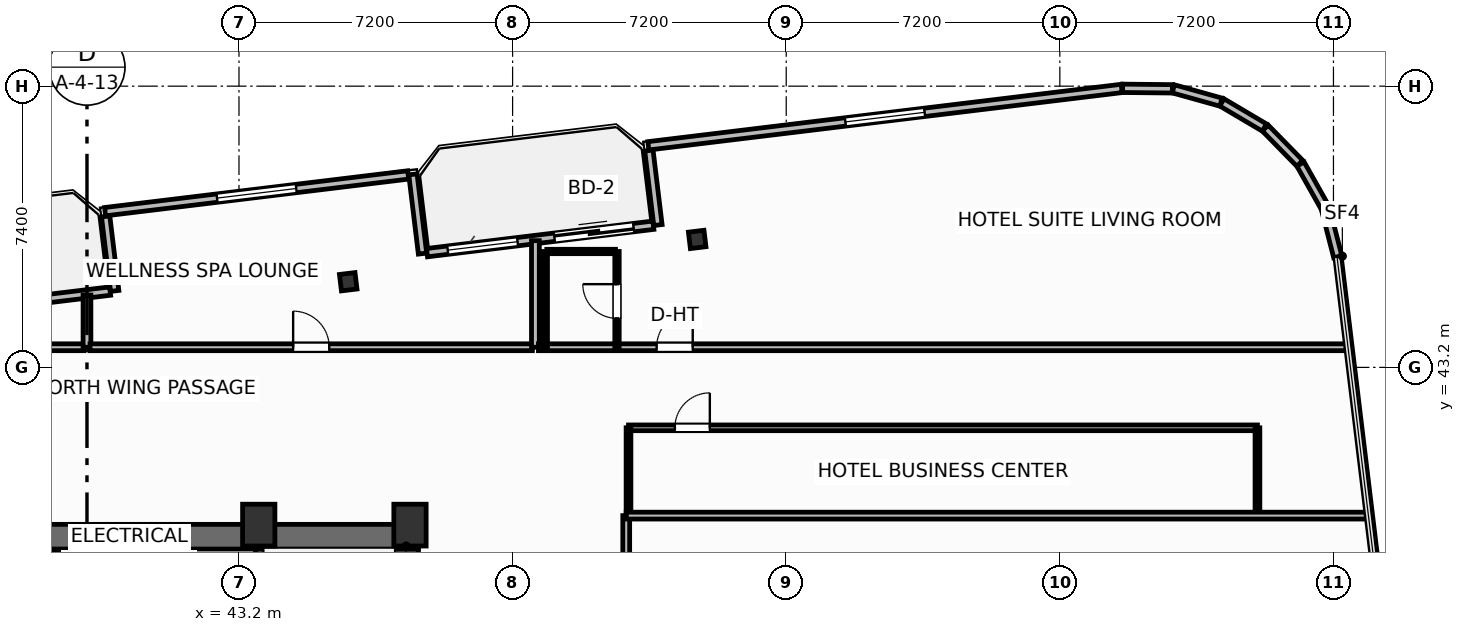
"""IFC4 building model, lengths in metres.
Left out: names, types, materials, properties, quantities, classifications, styles, units other than length and angle.
Written with IfcOpenShell. Run it as: python <this file> out.ifc"""

import sys

from ifc_helpers import new_model, si_unit, direction, frame, frame_2d, origin, origin_2d, place, context, subcontext, project, spatial, rectangle, i_section, extrude, element, fill, save


model = new_model("IFC4")
c1 = context("Model", 3, precision=1e-05, world=origin(), true_north=direction((0.0, 1.0)))
c2 = subcontext(c1, "Body", "Model", "MODEL_VIEW")
j1 = project(units=[si_unit("LENGTHUNIT", "METRE"), si_unit("PLANEANGLEUNIT", "RADIAN")], contexts=[c1])
p1 = place(None, origin())
s1 = spatial("IfcSite", under=j1, at=p1, CompositionType="ELEMENT")
p2 = place(p1, origin())
s2 = spatial("IfcBuilding", under=s1, at=p2, CompositionType="ELEMENT")
p3 = place(p2, frame((0.0, 0.0, 200.5)))
s3 = spatial("IfcBuildingStorey", under=s2, at=p3, CompositionType="ELEMENT", Elevation=200.5)
for number, where, z_axis, x_axis in (
    (1, (43.72, 39.05, 0.0), (0.0, 0.0, 1.0), (1.0, 0.0, 0.0)),
    (2, (47.7, 39.05, 0.0), (0.0, 0.0, 1.0), (1.0, 0.0, 0.0)),
):
    element("IfcColumn", number, at=place(p3, frame(where, z_axis=z_axis, x_axis=x_axis)), inside=s3, PredefinedType="COLUMN", context=c2, shape_type="SweptSolid", body=[
        extrude(rectangle(XDim=0.85, YDim=1.1, at=origin_2d()), origin(), (0.0, 0.0, 1.0), 3.7),
    ])
p4 = place(p3, frame((30.48, 38.745, 0.0), z_axis=(0.0, 0.0, 1.0), x_axis=(1.0, 0.0, 0.0)))
e3 = element("IfcWall", 3, at=p4, inside=s3, PredefinedType="SHEAR", context=c2, shape_type="SweptSolid", body=[
    extrude(rectangle(XDim=17.44, YDim=0.65, at=frame_2d((8.72, 0.0))), origin(), (0.0, 0.0, 1.0), 3.45),
])
p5 = place(p3, frame((47.595, 29.2, 0.0), z_axis=(0.0, 0.0, 1.0), x_axis=(0.0, 1.0, 0.0)))
e4 = element("IfcWall", 4, at=p5, inside=s3, PredefinedType="SHEAR", context=c2, shape_type="SweptSolid", body=[
    extrude(rectangle(XDim=9.22, YDim=0.65, at=frame_2d((4.61, 0.0))), origin(), (0.0, 0.0, 1.0), 3.45),
])
p6 = place(p3, frame((43.76, 29.2, 0.0), z_axis=(0.0, 0.0, 1.0), x_axis=(0.0, 1.0, 0.0)))
e5 = element("IfcWall", 5, at=p6, inside=s3, PredefinedType="SHEAR", context=c2, shape_type="SweptSolid", body=[
    extrude(rectangle(XDim=9.22, YDim=0.25, at=frame_2d((4.61, 0.0))), origin(), (0.0, 0.0, 1.0), 3.45),
])
p7 = place(p6, frame((0.65, 0.0, 0.0)))
e6 = element("IfcOpeningElement", 6, at=p7, cuts=e5, PredefinedType="OPENING", context=c2, shape_type="SweptSolid", body=[
    extrude(rectangle(XDim=1.05, YDim=2.15, at=frame_2d((0.525, 1.075))), frame((0.0, 0.135, 0.0), z_axis=(0.0, -1.0, 0.0), x_axis=(1.0, 0.0, 0.0)), (0.0, 0.0, 1.0), 0.27),
])
for number, where, z_axis, x_axis in (
    (7, (55.257, 46.567, 0.0), (0.0, 0.0, 1.0), (0.993, 0.12, 0.0)),
    (8, (46.075, 45.454, 0.0), (0.0, 0.0, 1.0), (0.993, 0.12, 0.0)),
):
    element("IfcColumn", number, at=place(p3, frame(where, z_axis=z_axis, x_axis=x_axis)), inside=s3, PredefinedType="COLUMN", context=c2, shape_type="SweptSolid", body=[
        extrude(i_section(OverallWidth=0.412, OverallDepth=0.435, WebThickness=0.036, FlangeThickness=0.057, FilletRadius=0.025, at=origin_2d()), origin(), (0.0, 0.0, 1.0), 3.7),
    ])
p8 = place(p3, frame((33.852, 44.486, 0.0), z_axis=(0.0, 0.0, 1.0), x_axis=(0.992729951822, 0.120362962556, 0.0)))
e9 = element("IfcWall", 9, at=p8, inside=s3, PredefinedType="SOLIDWALL", context=c2, shape_type="SweptSolid", body=[
    extrude(rectangle(XDim=6.0, YDim=0.22, at=frame_2d((3.0, 0.0))), origin(), (0.0, 0.0, 1.0), 2.73),
])
p9 = place(p8, frame((0.4, 0.0, 0.0)))
e10 = element("IfcOpeningElement", 10, at=p9, cuts=e9, PredefinedType="OPENING", context=c2, shape_type="SweptSolid", body=[
    extrude(rectangle(XDim=2.1, YDim=2.3, at=frame_2d((1.05, 1.15))), frame((0.0, 0.12, 0.0), z_axis=(0.0, -1.0, 0.0), x_axis=(1.0, 0.0, 0.0)), (0.0, 0.0, 1.0), 0.24),
])
p10 = place(p3, frame((48.148, 46.219, 0.0), z_axis=(0.0, 0.0, 1.0), x_axis=(0.992729951822, 0.120362962556, 0.0)))
e11 = element("IfcWall", 11, at=p10, inside=s3, PredefinedType="SOLIDWALL", context=c2, shape_type="SweptSolid", body=[
    extrude(rectangle(XDim=6.0, YDim=0.22, at=frame_2d((3.0, 0.0))), origin(), (0.0, 0.0, 1.0), 2.73),
])
p11 = place(p10, frame((3.376, 0.0, 0.0)))
e12 = element("IfcOpeningElement", 12, at=p11, cuts=e11, PredefinedType="OPENING", context=c2, shape_type="SweptSolid", body=[
    extrude(rectangle(XDim=2.1, YDim=2.3, at=frame_2d((1.05, 1.15))), frame((0.0, 0.12, 0.0), z_axis=(0.0, -1.0, 0.0), x_axis=(1.0, 0.0, 0.0)), (0.0, 0.0, 1.0), 0.24),
])
p12 = place(p10, frame((0.55, 0.0, 0.75)))
e13 = element("IfcOpeningElement", 13, at=p12, cuts=e11, PredefinedType="OPENING", context=c2, shape_type="SweptSolid", body=[
    extrude(rectangle(XDim=1.85, YDim=1.75, at=frame_2d((0.925, 0.875))), frame((0.0, 0.12, 0.0), z_axis=(0.0, -1.0, 0.0), x_axis=(1.0, 0.0, 0.0)), (0.0, 0.0, 1.0), 0.24),
])
p13 = place(p3, frame((72.114, 46.112, 0.0), z_axis=(0.0, 0.0, 1.0), x_axis=(-0.248942347653, 0.968518305219, 0.0)))
e14 = element("IfcWall", 14, at=p13, inside=s3, PredefinedType="SOLIDWALL", context=c2, shape_type="SweptSolid", body=[
    extrude(rectangle(XDim=1.326, YDim=0.22, at=frame_2d((0.663, 0.0))), origin(), (0.0, 0.0, 1.0), 2.73),
])
p14 = place(p3, frame((71.771, 47.418, 0.0), z_axis=(0.0, 0.0, 1.0), x_axis=(-0.491098509465, 0.871104043155, 0.0)))
e15 = element("IfcWall", 15, at=p14, inside=s3, PredefinedType="SOLIDWALL", context=c2, shape_type="SweptSolid", body=[
    extrude(rectangle(XDim=1.301, YDim=0.22, at=frame_2d((0.65, 0.0))), origin(), (0.0, 0.0, 1.0), 2.73),
])
p15 = place(p3, frame((71.115, 48.569, 0.0), z_axis=(0.0, 0.0, 1.0), x_axis=(-0.699844331926, 0.714295394827, 0.0)))
e16 = element("IfcWall", 16, at=p15, inside=s3, PredefinedType="SOLIDWALL", context=c2, shape_type="SweptSolid", body=[
    extrude(rectangle(XDim=1.301, YDim=0.22, at=frame_2d((0.65, 0.0))), origin(), (0.0, 0.0, 1.0), 2.73),
])
p16 = place(p3, frame((70.183, 49.511, 0.0), z_axis=(0.0, 0.0, 1.0), x_axis=(-0.860933999601, 0.508716668029, 0.0)))
e17 = element("IfcWall", 17, at=p16, inside=s3, PredefinedType="SOLIDWALL", context=c2, shape_type="SweptSolid", body=[
    extrude(rectangle(XDim=1.301, YDim=0.22, at=frame_2d((0.65, 0.0))), origin(), (0.0, 0.0, 1.0), 2.73),
])
p17 = place(p3, frame((69.039, 50.18, 0.0), z_axis=(0.0, 0.0, 1.0), x_axis=(-0.963205341366, 0.26876657226, 0.0)))
e18 = element("IfcWall", 18, at=p17, inside=s3, PredefinedType="SOLIDWALL", context=c2, shape_type="SweptSolid", body=[
    extrude(rectangle(XDim=1.301, YDim=0.22, at=frame_2d((0.65, 0.0))), origin(), (0.0, 0.0, 1.0), 2.73),
])
p18 = place(p3, frame((67.761, 50.53, 0.0), z_axis=(0.0, 0.0, 1.0), x_axis=(-0.999947358106, 0.010260653861, 0.0)))
e19 = element("IfcWall", 19, at=p18, inside=s3, PredefinedType="SOLIDWALL", context=c2, shape_type="SweptSolid", body=[
    extrude(rectangle(XDim=1.309, YDim=0.22, at=frame_2d((0.654, 0.0))), origin(), (0.0, 0.0, 1.0), 2.73),
])
p19 = place(p3, frame((66.427, 50.54, 0.0), z_axis=(0.0, 0.0, 1.0), x_axis=(-0.992731739233, -0.120348219431, 0.0)))
e20 = element("IfcWall", 20, at=p19, inside=s3, PredefinedType="SOLIDWALL", context=c2, shape_type="SweptSolid", body=[
    extrude(rectangle(XDim=12.547, YDim=0.22, at=frame_2d((6.273, 0.0))), origin(), (0.0, 0.0, 1.0), 2.73),
])
p20 = place(p19, frame((5.224, 0.0, 0.8)))
e21 = element("IfcOpeningElement", 21, at=p20, cuts=e20, PredefinedType="OPENING", context=c2, shape_type="SweptSolid", body=[
    extrude(rectangle(XDim=2.1, YDim=1.75, at=frame_2d((1.05, 0.875))), frame((0.0, 0.12, 0.0), z_axis=(0.0, -1.0, 0.0), x_axis=(1.0, 0.0, 0.0)), (0.0, 0.0, 1.0), 0.24),
])
p21 = place(p3, frame((53.987, 48.906, 0.0), z_axis=(0.0, 0.0, 1.0), x_axis=(0.120397815541, -0.992725725472, 0.0)))
e22 = element("IfcWall", 22, at=p21, inside=s3, PredefinedType="SOLIDWALL", context=c2, shape_type="SweptSolid", body=[
    extrude(rectangle(XDim=1.975, YDim=0.22, at=frame_2d((0.988, 0.0))), origin(), (0.0, 0.0, 1.0), 2.73),
])
p22 = place(p3, frame((48.03, 46.194, 0.0), z_axis=(0.0, 0.0, 1.0), x_axis=(-0.120314009587, 0.992735885871, 0.0)))
e23 = element("IfcWall", 23, at=p22, inside=s3, PredefinedType="SOLIDWALL", context=c2, shape_type="SweptSolid", body=[
    extrude(rectangle(XDim=2.1, YDim=0.22, at=frame_2d((1.05, 0.0))), origin(), (0.0, 0.0, 1.0), 2.73),
])
p23 = place(p3, frame((47.653, 48.264, 0.0), z_axis=(0.0, 0.0, 1.0), x_axis=(-0.992731032022, -0.120354052946, 0.0)))
e24 = element("IfcWall", 24, at=p23, inside=s3, PredefinedType="SOLIDWALL", context=c2, shape_type="SweptSolid", body=[
    extrude(rectangle(XDim=8.035, YDim=0.22, at=frame_2d((4.018, 0.0))), origin(), (0.0, 0.0, 1.0), 2.73),
])
p24 = place(p23, frame((2.968, 0.0, 0.8)))
e25 = element("IfcOpeningElement", 25, at=p24, cuts=e24, PredefinedType="OPENING", context=c2, shape_type="SweptSolid", body=[
    extrude(rectangle(XDim=2.1, YDim=1.75, at=frame_2d((1.05, 0.875))), frame((0.0, 0.12, 0.0), z_axis=(0.0, -1.0, 0.0), x_axis=(1.0, 0.0, 0.0)), (0.0, 0.0, 1.0), 0.24),
])
p25 = place(p3, frame((39.691, 47.173, 0.0), z_axis=(0.0, 0.0, 1.0), x_axis=(0.120397815541, -0.992725725472, 0.0)))
e26 = element("IfcWall", 26, at=p25, inside=s3, PredefinedType="SOLIDWALL", context=c2, shape_type="SweptSolid", body=[
    extrude(rectangle(XDim=1.975, YDim=0.22, at=frame_2d((0.988, 0.0))), origin(), (0.0, 0.0, 1.0), 2.73),
])
p26 = place(p3, frame((53.45, 41.61, 0.0), z_axis=(0.0, 0.0, 1.0), x_axis=(1.0, 0.0, 0.0)))
e27 = element("IfcWall", 27, at=p26, inside=s3, PredefinedType="PARTITIONING", context=c2, shape_type="SweptSolid", body=[
    extrude(rectangle(XDim=16.55, YDim=0.15, at=frame_2d((8.275, 0.0))), origin(), (0.0, 0.0, 1.0), 3.45),
])
p27 = place(p26, frame((1.22, 0.0, 0.0)))
e28 = element("IfcOpeningElement", 28, at=p27, cuts=e27, PredefinedType="OPENING", context=c2, shape_type="SweptSolid", body=[
    extrude(rectangle(XDim=0.92, YDim=2.05, at=frame_2d((0.46, 1.025))), frame((0.0, 0.085, 0.0), z_axis=(0.0, -1.0, 0.0), x_axis=(1.0, 0.0, 0.0)), (0.0, 0.0, 1.0), 0.17),
])
for number, where, z_axis, x_axis in (
    (29, (53.45, 39.3, 0.0), (0.0, 0.0, 1.0), (0.0, 1.0, 0.0)),
    (30, (70.0, 39.3, 0.0), (0.0, 0.0, 1.0), (0.0, 1.0, 0.0)),
):
    element("IfcWall", number, at=place(p3, frame(where, z_axis=z_axis, x_axis=x_axis)), inside=s3, PredefinedType="PARTITIONING", context=c2, shape_type="SweptSolid", body=[
        extrude(rectangle(XDim=2.31, YDim=0.125, at=frame_2d((1.155, 0.0))), origin(), (0.0, 0.0, 1.0), 3.45),
    ])
p28 = place(p3, frame((26.08, 43.73, 0.0), z_axis=(0.0, 0.0, 1.0), x_axis=(1.0, 0.0, 0.0)))
e31 = element("IfcWall", 31, at=p28, inside=s3, PredefinedType="PARTITIONING", context=c2, shape_type="SweptSolid", body=[
    extrude(rectangle(XDim=13.04, YDim=0.18, at=frame_2d((6.52, 0.0))), origin(), (0.0, 0.0, 1.0), 2.824),
])
p29 = place(p28, frame((6.045, 0.0, 0.0)))
e32 = element("IfcOpeningElement", 32, at=p29, cuts=e31, PredefinedType="OPENING", context=c2, shape_type="SweptSolid", body=[
    extrude(rectangle(XDim=0.95, YDim=2.05, at=frame_2d((0.475, 1.025))), frame((0.0, 0.1, 0.0), z_axis=(0.0, -1.0, 0.0), x_axis=(1.0, 0.0, 0.0)), (0.0, 0.0, 1.0), 0.2),
])
p30 = place(p3, frame((39.2, 43.73, 0.0), z_axis=(0.0, 0.0, 1.0), x_axis=(0.0, 1.0, 0.0)))
e33 = element("IfcWall", 33, at=p30, inside=s3, PredefinedType="PARTITIONING", context=c2, shape_type="SweptSolid", body=[
    extrude(rectangle(XDim=1.374, YDim=0.205, at=frame_2d((0.687, 0.0))), origin(), (0.0, 0.0, 1.0), 3.45),
])
p31 = place(p3, frame((39.28, 43.73, 0.0), z_axis=(0.0, 0.0, 1.0), x_axis=(1.0, 0.0, 0.0)))
e34 = element("IfcWall", 34, at=p31, inside=s3, PredefinedType="PARTITIONING", context=c2, shape_type="SweptSolid", body=[
    extrude(rectangle(XDim=11.64, YDim=0.18, at=frame_2d((5.82, 0.0))), origin(), (0.0, 0.0, 1.0), 3.018),
])
p32 = place(p31, frame((5.345, 0.0, 0.0)))
e35 = element("IfcOpeningElement", 35, at=p32, cuts=e34, PredefinedType="OPENING", context=c2, shape_type="SweptSolid", body=[
    extrude(rectangle(XDim=0.95, YDim=2.05, at=frame_2d((0.475, 1.025))), frame((0.0, 0.1, 0.0), z_axis=(0.0, -1.0, 0.0), x_axis=(1.0, 0.0, 0.0)), (0.0, 0.0, 1.0), 0.2),
])
p33 = place(p3, frame((51.0, 43.73, 0.0), z_axis=(0.0, 0.0, 1.0), x_axis=(0.0, 1.0, 0.0)))
e36 = element("IfcWall", 36, at=p33, inside=s3, PredefinedType="PARTITIONING", context=c2, shape_type="SweptSolid", body=[
    extrude(rectangle(XDim=2.804, YDim=0.205, at=frame_2d((1.402, 0.0))), origin(), (0.0, 0.0, 1.0), 3.45),
])
p34 = place(p3, frame((51.08, 43.73, 0.0), z_axis=(0.0, 0.0, 1.0), x_axis=(1.0, 0.0, 0.0)))
e37 = element("IfcWall", 37, at=p34, inside=s3, PredefinedType="PARTITIONING", context=c2, shape_type="SweptSolid", body=[
    extrude(rectangle(XDim=21.263, YDim=0.18, at=frame_2d((10.632, 0.0))), origin(), (0.0, 0.0, 1.0), 3.45),
])
p35 = place(p34, frame((3.11, 0.0, 0.0)))
e38 = element("IfcOpeningElement", 38, at=p35, cuts=e37, PredefinedType="OPENING", context=c2, shape_type="SweptSolid", body=[
    extrude(rectangle(XDim=0.95, YDim=2.15, at=frame_2d((0.475, 1.075))), frame((0.0, 0.1, 0.0), z_axis=(0.0, -1.0, 0.0), x_axis=(1.0, 0.0, 0.0)), (0.0, 0.0, 1.0), 0.2),
])
p36 = place(p3, frame((51.3, 46.25, 0.0), z_axis=(0.0, 0.0, 1.0), x_axis=(1.0, 0.0, 0.0)))
e39 = element("IfcWall", 39, at=p36, inside=s3, PredefinedType="PARTITIONING", context=c2, shape_type="SweptSolid", body=[
    extrude(rectangle(XDim=1.807, YDim=0.115, at=frame_2d((0.904, 0.0))), origin(), (0.0, 0.0, 1.0), 2.824),
])
p37 = place(p3, frame((53.147, 43.73, 0.0), z_axis=(0.0, 0.0, 1.0), x_axis=(0.0, 1.0, 0.0)))
e40 = element("IfcWall", 40, at=p37, inside=s3, PredefinedType="PARTITIONING", context=c2, shape_type="SweptSolid", body=[
    extrude(rectangle(XDim=2.52, YDim=0.115, at=frame_2d((1.26, 0.0))), origin(), (0.0, 0.0, 1.0), 3.45),
])
p38 = place(p37, frame((0.76, 0.0, 0.0)))
e41 = element("IfcOpeningElement", 41, at=p38, cuts=e40, PredefinedType="OPENING", context=c2, shape_type="SweptSolid", body=[
    extrude(rectangle(XDim=0.9, YDim=2.05, at=frame_2d((0.45, 1.025))), frame((0.0, 0.067, 0.0), z_axis=(0.0, -1.0, 0.0), x_axis=(1.0, 0.0, 0.0)), (0.0, 0.0, 1.0), 0.135),
])
p39 = place(p3, frame((51.26, 43.73, 0.0), z_axis=(0.0, 0.0, 1.0), x_axis=(0.0, 1.0, 0.0)))
e42 = element("IfcWall", 42, at=p39, inside=s3, PredefinedType="PARTITIONING", context=c2, shape_type="SweptSolid", body=[
    extrude(rectangle(XDim=2.52, YDim=0.115, at=frame_2d((1.26, 0.0))), origin(), (0.0, 0.0, 1.0), 3.45),
])
p40 = place(p3, frame((53.39, 19.24, 0.0), z_axis=(0.0, 0.0, 1.0), x_axis=(0.0, 1.0, 0.0)))
e43 = element("IfcWall", 43, at=p40, inside=s3, PredefinedType="PARTITIONING", context=c2, shape_type="SweptSolid", body=[
    extrude(rectangle(XDim=20.06, YDim=0.18, at=frame_2d((10.03, 0.0))), origin(), (0.0, 0.0, 1.0), 3.45),
])
p41 = place(p40, frame((7.7, 0.0, 0.0)))
e44 = element("IfcOpeningElement", 44, at=p41, cuts=e43, PredefinedType="OPENING", context=c2, shape_type="SweptSolid", body=[
    extrude(rectangle(XDim=0.95, YDim=2.05, at=frame_2d((0.475, 1.025))), frame((0.0, 0.1, 0.0), z_axis=(0.0, -1.0, 0.0), x_axis=(1.0, 0.0, 0.0)), (0.0, 0.0, 1.0), 0.2),
])
p42 = place(p3, frame((53.39, 39.3, 0.0), z_axis=(0.0, 0.0, 1.0), x_axis=(1.0, 0.0, 0.0)))
e45 = element("IfcWall", 45, at=p42, inside=s3, PredefinedType="PARTITIONING", context=c2, shape_type="SweptSolid", body=[
    extrude(rectangle(XDim=19.49, YDim=0.18, at=frame_2d((9.745, 0.0))), origin(), (0.0, 0.0, 1.0), 3.45),
])
p43 = place(p11, origin())
e46 = element("IfcDoor", 46, at=p43, inside=s3, OperationType="SLIDING_TO_LEFT", PredefinedType="DOOR", context=c2, shape_type="SweptSolid", body=[
    extrude(rectangle(XDim=2.1, YDim=2.3, at=frame_2d((1.05, 1.15))), frame((0.0, 0.025, 0.0), z_axis=(0.0, -1.0, 0.0), x_axis=(1.0, 0.0, 0.0)), (0.0, 0.0, 1.0), 0.05),
])
fill(e12, e46)
p44 = place(p12, origin())
e47 = element("IfcWindow", 47, at=p44, inside=s3, PartitioningType="SINGLE_PANEL", PredefinedType="WINDOW", context=c2, shape_type="SweptSolid", body=[
    extrude(rectangle(XDim=1.85, YDim=1.75, at=frame_2d((0.925, 0.875))), frame((0.0, 0.03, 0.0), z_axis=(0.0, -1.0, 0.0), x_axis=(1.0, 0.0, 0.0)), (0.0, 0.0, 1.0), 0.06),
])
fill(e13, e47)
p45 = place(p20, origin())
e48 = element("IfcWindow", 48, at=p45, inside=s3, PartitioningType="SINGLE_PANEL", PredefinedType="WINDOW", context=c2, shape_type="SweptSolid", body=[
    extrude(rectangle(XDim=2.1, YDim=1.75, at=frame_2d((1.05, 0.875))), frame((0.0, 0.03, 0.0), z_axis=(0.0, -1.0, 0.0), x_axis=(1.0, 0.0, 0.0)), (0.0, 0.0, 1.0), 0.06),
])
fill(e21, e48)
p46 = place(p24, origin())
e49 = element("IfcWindow", 49, at=p46, inside=s3, PartitioningType="SINGLE_PANEL", PredefinedType="WINDOW", context=c2, shape_type="SweptSolid", body=[
    extrude(rectangle(XDim=2.1, YDim=1.75, at=frame_2d((1.05, 0.875))), frame((0.0, 0.03, 0.0), z_axis=(0.0, -1.0, 0.0), x_axis=(1.0, 0.0, 0.0)), (0.0, 0.0, 1.0), 0.06),
])
fill(e25, e49)
p47 = place(p27, origin())
e50 = element("IfcDoor", 50, at=p47, inside=s3, OperationType="SINGLE_SWING_RIGHT", PredefinedType="DOOR", context=c2, shape_type="SweptSolid", body=[
    extrude(rectangle(XDim=0.92, YDim=2.05, at=frame_2d((0.46, 1.025))), frame((0.0, 0.025, 0.0), z_axis=(0.0, -1.0, 0.0), x_axis=(1.0, 0.0, 0.0)), (0.0, 0.0, 1.0), 0.05),
])
fill(e28, e50)
p48 = place(p32, origin())
e51 = element("IfcDoor", 51, at=p48, inside=s3, OperationType="SINGLE_SWING_LEFT", PredefinedType="DOOR", context=c2, shape_type="SweptSolid", body=[
    extrude(rectangle(XDim=0.95, YDim=2.05, at=frame_2d((0.475, 1.025))), frame((0.0, 0.025, 0.0), z_axis=(0.0, -1.0, 0.0), x_axis=(1.0, 0.0, 0.0)), (0.0, 0.0, 1.0), 0.05),
])
fill(e35, e51)
p49 = place(p35, origin())
e52 = element("IfcDoor", 52, at=p49, inside=s3, OperationType="SINGLE_SWING_RIGHT", PredefinedType="DOOR", context=c2, shape_type="SweptSolid", body=[
    extrude(rectangle(XDim=0.95, YDim=2.15, at=frame_2d((0.475, 1.075))), frame((0.0, 0.025, 0.0), z_axis=(0.0, -1.0, 0.0), x_axis=(1.0, 0.0, 0.0)), (0.0, 0.0, 1.0), 0.05),
])
fill(e38, e52)
p50 = place(p38, origin())
e53 = element("IfcDoor", 53, at=p50, inside=s3, OperationType="SINGLE_SWING_RIGHT", PredefinedType="DOOR", context=c2, shape_type="SweptSolid", body=[
    extrude(rectangle(XDim=0.9, YDim=2.05, at=frame_2d((0.45, 1.025))), frame((0.0, 0.025, 0.0), z_axis=(0.0, -1.0, 0.0), x_axis=(1.0, 0.0, 0.0)), (0.0, 0.0, 1.0), 0.05),
])
fill(e41, e53)
save(model, sys.argv[1])
